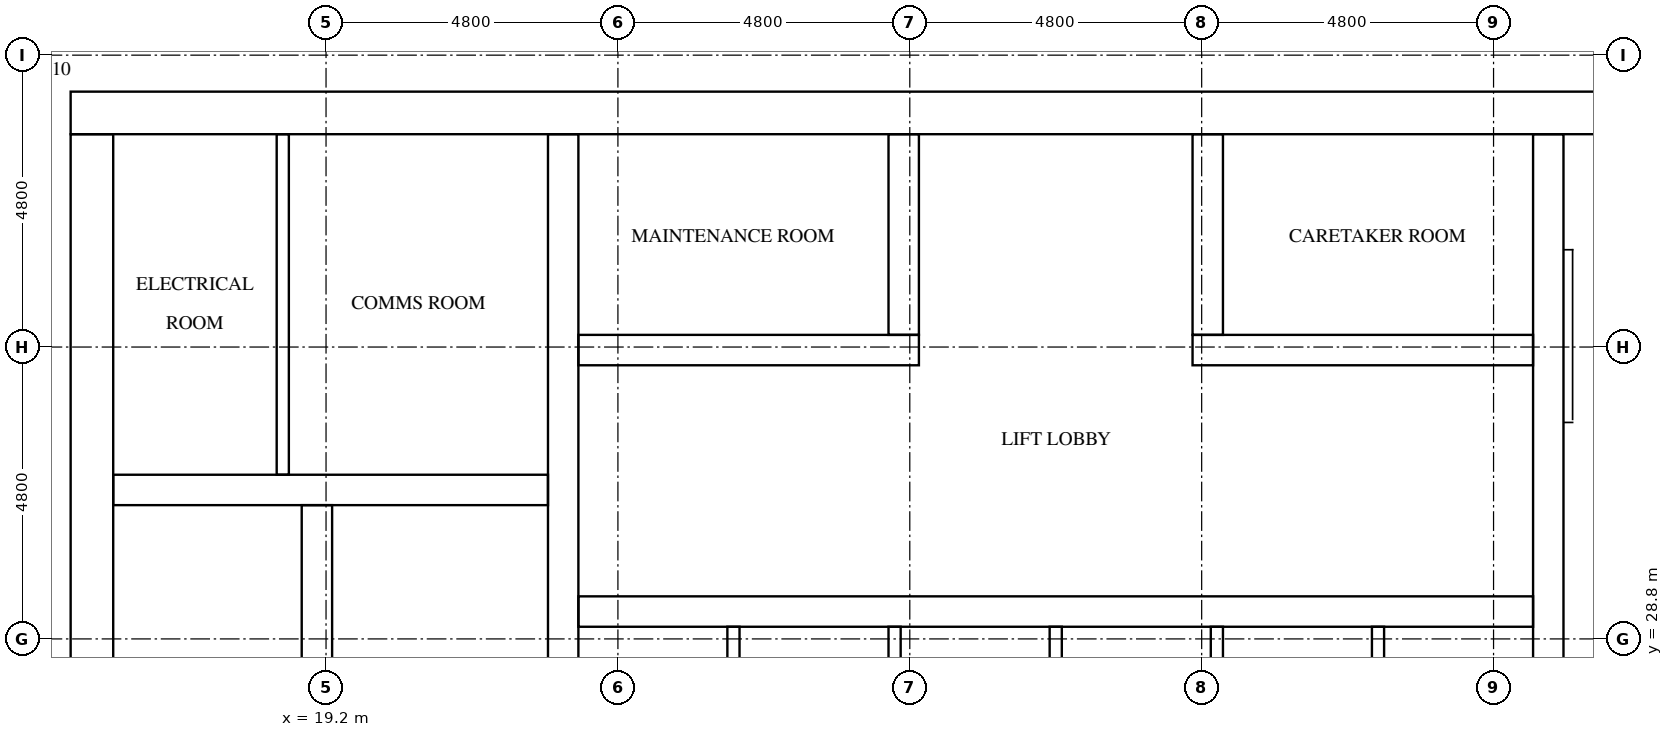
"""IFC4 building model, lengths in metres.
Left out: names, types, materials, properties, quantities, classifications, styles, units other than length and angle.
Written with IfcOpenShell. Run it as: python <this file> out.ifc"""

import sys

from ifc_helpers import new_model, si_unit, direction, frame, frame_2d, origin, place, context, subcontext, project, spatial, rectangle, extrude, element, fill, save


model = new_model("IFC4")
c1 = context("Model", 3, precision=1e-05, world=origin(), true_north=direction((0.0, 1.0)))
c2 = subcontext(c1, "Body", "Model", "MODEL_VIEW")
j1 = project(units=[si_unit("LENGTHUNIT", "METRE"), si_unit("PLANEANGLEUNIT", "RADIAN")], contexts=[c1])
p1 = place(None, origin())
s1 = spatial("IfcSite", under=j1, at=p1, CompositionType="ELEMENT")
p2 = place(p1, origin())
s2 = spatial("IfcBuilding", under=s1, at=p2, CompositionType="ELEMENT")
p3 = place(p2, frame((0.0, 0.0, 229.8)))
s3 = spatial("IfcBuildingStorey", under=s2, at=p3, CompositionType="ELEMENT", Elevation=229.8)
p4 = place(p3, frame((15.0, 37.45, 0.0), z_axis=(0.0, 0.0, 1.0), x_axis=(1.0, 0.0, 0.0)))
e1 = element("IfcWall", 1, at=p4, inside=s3, PredefinedType="SHEAR", context=c2, shape_type="SweptSolid", body=[
    extrude(rectangle(XDim=32.4, YDim=0.7, at=frame_2d((16.2, 0.0))), origin(), (0.0, 0.0, 1.0), 3.1),
])
p5 = place(p4, frame((15.3, 0.0, 0.0)))
e2 = element("IfcOpeningElement", 2, at=p5, cuts=e1, PredefinedType="OPENING", context=c2, shape_type="SweptSolid", body=[
    extrude(rectangle(XDim=1.8, YDim=2.1, at=frame_2d((0.9, 1.05))), frame((0.0, 0.36, 0.0), z_axis=(0.0, -1.0, 0.0), x_axis=(1.0, 0.0, 0.0)), (0.0, 0.0, 1.0), 0.72),
])
p6 = place(p4, frame((1.544, 0.0, 0.0)))
e3 = element("IfcOpeningElement", 3, at=p6, cuts=e1, PredefinedType="OPENING", context=c2, shape_type="SweptSolid", body=[
    extrude(rectangle(XDim=1.0, YDim=2.1, at=frame_2d((0.5, 1.05))), frame((0.0, 0.36, 0.0), z_axis=(0.0, -1.0, 0.0), x_axis=(1.0, 0.0, 0.0)), (0.0, 0.0, 1.0), 0.72),
])
p7 = place(p4, frame((5.219, 0.0, 0.0)))
e4 = element("IfcOpeningElement", 4, at=p7, cuts=e1, PredefinedType="OPENING", context=c2, shape_type="SweptSolid", body=[
    extrude(rectangle(XDim=1.0, YDim=2.1, at=frame_2d((0.5, 1.05))), frame((0.0, 0.36, 0.0), z_axis=(0.0, -1.0, 0.0), x_axis=(1.0, 0.0, 0.0)), (0.0, 0.0, 1.0), 0.72),
])
p8 = place(p3, frame((15.35, 15.7, 0.0), z_axis=(0.0, 0.0, 1.0), x_axis=(0.0, 1.0, 0.0)))
e5 = element("IfcWall", 5, at=p8, inside=s3, PredefinedType="SHEAR", context=c2, shape_type="SweptSolid", body=[
    extrude(rectangle(XDim=21.4, YDim=0.7, at=frame_2d((10.7, 0.0))), origin(), (0.0, 0.0, 1.0), 3.1),
])
p9 = place(p8, frame((5.06, 0.0, 0.0)))
e6 = element("IfcOpeningElement", 6, at=p9, cuts=e5, PredefinedType="OPENING", context=c2, shape_type="SweptSolid", body=[
    extrude(rectangle(XDim=1.2, YDim=2.1, at=frame_2d((0.6, 1.05))), frame((0.0, 0.36, 0.0), z_axis=(0.0, -1.0, 0.0), x_axis=(1.0, 0.0, 0.0)), (0.0, 0.0, 1.0), 0.72),
])
p10 = place(p3, frame((19.05, 15.7, 0.0), z_axis=(0.0, 0.0, 1.0), x_axis=(0.0, 1.0, 0.0)))
e7 = element("IfcWall", 7, at=p10, inside=s3, PredefinedType="SHEAR", context=c2, shape_type="SweptSolid", body=[
    extrude(rectangle(XDim=15.3, YDim=0.5, at=frame_2d((7.65, 0.0))), origin(), (0.0, 0.0, 1.0), 3.1),
])
p11 = place(p10, frame((9.75, 0.0, 0.0)))
e8 = element("IfcOpeningElement", 8, at=p11, cuts=e7, PredefinedType="OPENING", context=c2, shape_type="SweptSolid", body=[
    extrude(rectangle(XDim=1.1, YDim=2.1, at=frame_2d((0.55, 1.05))), frame((0.0, 0.26, 0.0), z_axis=(0.0, -1.0, 0.0), x_axis=(1.0, 0.0, 0.0)), (0.0, 0.0, 1.0), 0.52),
])
p12 = place(p10, frame((13.25, 0.0, 0.0)))
e9 = element("IfcOpeningElement", 9, at=p12, cuts=e7, PredefinedType="OPENING", context=c2, shape_type="SweptSolid", body=[
    extrude(rectangle(XDim=1.1, YDim=2.1, at=frame_2d((0.55, 1.05))), frame((0.0, 0.26, 0.0), z_axis=(0.0, -1.0, 0.0), x_axis=(1.0, 0.0, 0.0)), (0.0, 0.0, 1.0), 0.52),
])
p13 = place(p10, frame((0.5, 0.0, 0.0)))
e10 = element("IfcOpeningElement", 10, at=p13, cuts=e7, PredefinedType="OPENING", context=c2, shape_type="SweptSolid", body=[
    extrude(rectangle(XDim=1.2, YDim=2.1, at=frame_2d((0.6, 1.05))), frame((0.0, 0.26, 0.0), z_axis=(0.0, -1.0, 0.0), x_axis=(1.0, 0.0, 0.0)), (0.0, 0.0, 1.0), 0.52),
])
p14 = place(p3, frame((23.1, 15.7, 0.0), z_axis=(0.0, 0.0, 1.0), x_axis=(0.0, 1.0, 0.0)))
e11 = element("IfcWall", 11, at=p14, inside=s3, PredefinedType="SHEAR", context=c2, shape_type="SweptSolid", body=[
    extrude(rectangle(XDim=21.4, YDim=0.5, at=frame_2d((10.7, 0.0))), origin(), (0.0, 0.0, 1.0), 3.1),
])
p15 = place(p3, frame((39.3, 27.75, 0.0), z_axis=(0.0, 0.0, 1.0), x_axis=(0.0, 1.0, 0.0)))
e12 = element("IfcWall", 12, at=p15, inside=s3, PredefinedType="SHEAR", context=c2, shape_type="SweptSolid", body=[
    extrude(rectangle(XDim=9.35, YDim=0.5, at=frame_2d((4.675, 0.0))), origin(), (0.0, 0.0, 1.0), 3.1),
])
p16 = place(p3, frame((15.7, 31.25, 0.0), z_axis=(0.0, 0.0, 1.0), x_axis=(1.0, 0.0, 0.0)))
e13 = element("IfcWall", 13, at=p16, inside=s3, PredefinedType="SHEAR", context=c2, shape_type="SweptSolid", body=[
    extrude(rectangle(XDim=7.15, YDim=0.5, at=frame_2d((3.575, 0.0))), origin(), (0.0, 0.0, 1.0), 3.1),
])
p17 = place(p3, frame((23.35, 29.25, 0.0), z_axis=(0.0, 0.0, 1.0), x_axis=(1.0, 0.0, 0.0)))
e14 = element("IfcWall", 14, at=p17, inside=s3, PredefinedType="SHEAR", context=c2, shape_type="SweptSolid", body=[
    extrude(rectangle(XDim=15.7, YDim=0.5, at=frame_2d((7.85, 0.0))), origin(), (0.0, 0.0, 1.0), 3.1),
])
p18 = place(p17, frame((0.675, 0.0, 0.0)))
e15 = element("IfcOpeningElement", 15, at=p18, cuts=e14, PredefinedType="OPENING", context=c2, shape_type="SweptSolid", body=[
    extrude(rectangle(XDim=1.1, YDim=2.1, at=frame_2d((0.55, 1.05))), frame((0.0, 0.26, 0.0), z_axis=(0.0, -1.0, 0.0), x_axis=(1.0, 0.0, 0.0)), (0.0, 0.0, 1.0), 0.52),
])
p19 = place(p17, frame((3.325, 0.0, 0.0)))
e16 = element("IfcOpeningElement", 16, at=p19, cuts=e14, PredefinedType="OPENING", context=c2, shape_type="SweptSolid", body=[
    extrude(rectangle(XDim=1.1, YDim=2.1, at=frame_2d((0.55, 1.05))), frame((0.0, 0.26, 0.0), z_axis=(0.0, -1.0, 0.0), x_axis=(1.0, 0.0, 0.0)), (0.0, 0.0, 1.0), 0.52),
])
p20 = place(p17, frame((5.975, 0.0, 0.0)))
e17 = element("IfcOpeningElement", 17, at=p20, cuts=e14, PredefinedType="OPENING", context=c2, shape_type="SweptSolid", body=[
    extrude(rectangle(XDim=1.1, YDim=2.1, at=frame_2d((0.55, 1.05))), frame((0.0, 0.26, 0.0), z_axis=(0.0, -1.0, 0.0), x_axis=(1.0, 0.0, 0.0)), (0.0, 0.0, 1.0), 0.52),
])
p21 = place(p17, frame((8.625, 0.0, 0.0)))
e18 = element("IfcOpeningElement", 18, at=p21, cuts=e14, PredefinedType="OPENING", context=c2, shape_type="SweptSolid", body=[
    extrude(rectangle(XDim=1.1, YDim=2.1, at=frame_2d((0.55, 1.05))), frame((0.0, 0.26, 0.0), z_axis=(0.0, -1.0, 0.0), x_axis=(1.0, 0.0, 0.0)), (0.0, 0.0, 1.0), 0.52),
])
p22 = place(p17, frame((11.275, 0.0, 0.0)))
e19 = element("IfcOpeningElement", 19, at=p22, cuts=e14, PredefinedType="OPENING", context=c2, shape_type="SweptSolid", body=[
    extrude(rectangle(XDim=1.1, YDim=2.1, at=frame_2d((0.55, 1.05))), frame((0.0, 0.26, 0.0), z_axis=(0.0, -1.0, 0.0), x_axis=(1.0, 0.0, 0.0)), (0.0, 0.0, 1.0), 0.52),
])
p23 = place(p17, frame((13.925, 0.0, 0.0)))
e20 = element("IfcOpeningElement", 20, at=p23, cuts=e14, PredefinedType="OPENING", context=c2, shape_type="SweptSolid", body=[
    extrude(rectangle(XDim=1.1, YDim=2.1, at=frame_2d((0.55, 1.05))), frame((0.0, 0.26, 0.0), z_axis=(0.0, -1.0, 0.0), x_axis=(1.0, 0.0, 0.0)), (0.0, 0.0, 1.0), 0.52),
])
p24 = place(p3, frame((23.35, 33.55, 0.0), z_axis=(0.0, 0.0, 1.0), x_axis=(1.0, 0.0, 0.0)))
e21 = element("IfcWall", 21, at=p24, inside=s3, PredefinedType="SHEAR", context=c2, shape_type="SweptSolid", body=[
    extrude(rectangle(XDim=5.6, YDim=0.5, at=frame_2d((2.8, 0.0))), origin(), (0.0, 0.0, 1.0), 3.1),
])
p25 = place(p24, frame((2.05, 0.0, 0.0)))
e22 = element("IfcOpeningElement", 22, at=p25, cuts=e21, PredefinedType="OPENING", context=c2, shape_type="SweptSolid", body=[
    extrude(rectangle(XDim=1.0, YDim=2.1, at=frame_2d((0.5, 1.05))), frame((0.0, 0.26, 0.0), z_axis=(0.0, -1.0, 0.0), x_axis=(1.0, 0.0, 0.0)), (0.0, 0.0, 1.0), 0.52),
])
p26 = place(p3, frame((33.45, 33.55, 0.0), z_axis=(0.0, 0.0, 1.0), x_axis=(1.0, 0.0, 0.0)))
e23 = element("IfcWall", 23, at=p26, inside=s3, PredefinedType="SHEAR", context=c2, shape_type="SweptSolid", body=[
    extrude(rectangle(XDim=5.6, YDim=0.5, at=frame_2d((2.8, 0.0))), origin(), (0.0, 0.0, 1.0), 3.1),
])
p27 = place(p26, frame((2.55, 0.0, 0.0)))
e24 = element("IfcOpeningElement", 24, at=p27, cuts=e23, PredefinedType="OPENING", context=c2, shape_type="SweptSolid", body=[
    extrude(rectangle(XDim=1.0, YDim=2.1, at=frame_2d((0.5, 1.05))), frame((0.0, 0.26, 0.0), z_axis=(0.0, -1.0, 0.0), x_axis=(1.0, 0.0, 0.0)), (0.0, 0.0, 1.0), 0.52),
])
for number, where, z_axis, x_axis in (
    (25, (28.7, 33.8, 0.0), (0.0, 0.0, 1.0), (0.0, 1.0, 0.0)),
    (26, (33.7, 33.8, 0.0), (0.0, 0.0, 1.0), (0.0, 1.0, 0.0)),
):
    element("IfcWall", number, at=place(p3, frame(where, z_axis=z_axis, x_axis=x_axis)), inside=s3, PredefinedType="SHEAR", context=c2, shape_type="SweptSolid", body=[
        extrude(rectangle(XDim=3.3, YDim=0.5, at=frame_2d((1.65, 0.0))), origin(), (0.0, 0.0, 1.0), 3.1),
    ])
for number, where, z_axis, x_axis in (
    (27, (25.9, 26.4, 0.0), (0.0, 0.0, 1.0), (0.0, 1.0, 0.0)),
    (28, (28.55, 26.4, 0.0), (0.0, 0.0, 1.0), (0.0, 1.0, 0.0)),
    (29, (31.2, 26.4, 0.0), (0.0, 0.0, 1.0), (0.0, 1.0, 0.0)),
    (30, (33.85, 26.4, 0.0), (0.0, 0.0, 1.0), (0.0, 1.0, 0.0)),
    (31, (36.5, 26.4, 0.0), (0.0, 0.0, 1.0), (0.0, 1.0, 0.0)),
):
    element("IfcWall", number, at=place(p3, frame(where, z_axis=z_axis, x_axis=x_axis)), inside=s3, PredefinedType="SOLIDWALL", context=c2, shape_type="SweptSolid", body=[
        extrude(rectangle(XDim=2.6, YDim=0.2, at=frame_2d((1.3, 0.0))), origin(), (0.0, 0.0, 1.0), 3.1),
    ])
p28 = place(p3, frame((18.489, 31.5, 0.0), z_axis=(0.0, 0.0, 1.0), x_axis=(0.0, 1.0, 0.0)))
e32 = element("IfcWall", 32, at=p28, inside=s3, PredefinedType="PARTITIONING", context=c2, shape_type="SweptSolid", body=[
    extrude(rectangle(XDim=5.6, YDim=0.2, at=frame_2d((2.8, 0.0))), origin(), (0.0, 0.0, 1.0), 3.1),
])
p29 = place(p18, origin())
e33 = element("IfcDoor", 33, at=p29, inside=s3, OperationType="DOUBLE_DOOR_SLIDING", PredefinedType="DOOR", context=c2, shape_type="SweptSolid", body=[
    extrude(rectangle(XDim=1.1, YDim=2.1, at=frame_2d((0.55, 1.05))), frame((0.0, 0.025, 0.0), z_axis=(0.0, -1.0, 0.0), x_axis=(1.0, 0.0, 0.0)), (0.0, 0.0, 1.0), 0.05),
])
fill(e15, e33)
p30 = place(p19, origin())
e34 = element("IfcDoor", 34, at=p30, inside=s3, OperationType="DOUBLE_DOOR_SLIDING", PredefinedType="DOOR", context=c2, shape_type="SweptSolid", body=[
    extrude(rectangle(XDim=1.1, YDim=2.1, at=frame_2d((0.55, 1.05))), frame((0.0, 0.025, 0.0), z_axis=(0.0, -1.0, 0.0), x_axis=(1.0, 0.0, 0.0)), (0.0, 0.0, 1.0), 0.05),
])
fill(e16, e34)
p31 = place(p20, origin())
e35 = element("IfcDoor", 35, at=p31, inside=s3, OperationType="DOUBLE_DOOR_SLIDING", PredefinedType="DOOR", context=c2, shape_type="SweptSolid", body=[
    extrude(rectangle(XDim=1.1, YDim=2.1, at=frame_2d((0.55, 1.05))), frame((0.0, 0.025, 0.0), z_axis=(0.0, -1.0, 0.0), x_axis=(1.0, 0.0, 0.0)), (0.0, 0.0, 1.0), 0.05),
])
fill(e17, e35)
p32 = place(p21, origin())
e36 = element("IfcDoor", 36, at=p32, inside=s3, OperationType="DOUBLE_DOOR_SLIDING", PredefinedType="DOOR", context=c2, shape_type="SweptSolid", body=[
    extrude(rectangle(XDim=1.1, YDim=2.1, at=frame_2d((0.55, 1.05))), frame((0.0, 0.025, 0.0), z_axis=(0.0, -1.0, 0.0), x_axis=(1.0, 0.0, 0.0)), (0.0, 0.0, 1.0), 0.05),
])
fill(e18, e36)
p33 = place(p22, origin())
e37 = element("IfcDoor", 37, at=p33, inside=s3, OperationType="DOUBLE_DOOR_SLIDING", PredefinedType="DOOR", context=c2, shape_type="SweptSolid", body=[
    extrude(rectangle(XDim=1.1, YDim=2.1, at=frame_2d((0.55, 1.05))), frame((0.0, 0.025, 0.0), z_axis=(0.0, -1.0, 0.0), x_axis=(1.0, 0.0, 0.0)), (0.0, 0.0, 1.0), 0.05),
])
fill(e19, e37)
p34 = place(p23, origin())
e38 = element("IfcDoor", 38, at=p34, inside=s3, OperationType="DOUBLE_DOOR_SLIDING", PredefinedType="DOOR", context=c2, shape_type="SweptSolid", body=[
    extrude(rectangle(XDim=1.1, YDim=2.1, at=frame_2d((0.55, 1.05))), frame((0.0, 0.025, 0.0), z_axis=(0.0, -1.0, 0.0), x_axis=(1.0, 0.0, 0.0)), (0.0, 0.0, 1.0), 0.05),
])
fill(e20, e38)
p35 = place(p12, origin())
e39 = element("IfcDoor", 39, at=p35, inside=s3, OperationType="DOUBLE_DOOR_SLIDING", PredefinedType="DOOR", context=c2, shape_type="SweptSolid", body=[
    extrude(rectangle(XDim=1.1, YDim=2.1, at=frame_2d((0.55, 1.05))), frame((0.0, 0.025, 0.0), z_axis=(0.0, -1.0, 0.0), x_axis=(1.0, 0.0, 0.0)), (0.0, 0.0, 1.0), 0.05),
])
fill(e9, e39)
p36 = place(p5, origin())
e40 = element("IfcDoor", 40, at=p36, inside=s3, OperationType="DOUBLE_DOOR_SINGLE_SWING", PredefinedType="DOOR", context=c2, shape_type="SweptSolid", body=[
    extrude(rectangle(XDim=1.8, YDim=2.1, at=frame_2d((0.9, 1.05))), frame((0.0, 0.025, 0.0), z_axis=(0.0, -1.0, 0.0), x_axis=(1.0, 0.0, 0.0)), (0.0, 0.0, 1.0), 0.05),
])
fill(e2, e40)
p37 = place(p6, origin())
e41 = element("IfcDoor", 41, at=p37, inside=s3, OperationType="SINGLE_SWING_LEFT", PredefinedType="DOOR", context=c2, shape_type="SweptSolid", body=[
    extrude(rectangle(XDim=1.0, YDim=2.1, at=frame_2d((0.5, 1.05))), frame((0.0, 0.025, 0.0), z_axis=(0.0, -1.0, 0.0), x_axis=(1.0, 0.0, 0.0)), (0.0, 0.0, 1.0), 0.05),
])
fill(e3, e41)
p38 = place(p7, origin())
e42 = element("IfcDoor", 42, at=p38, inside=s3, OperationType="SINGLE_SWING_RIGHT", PredefinedType="DOOR", context=c2, shape_type="SweptSolid", body=[
    extrude(rectangle(XDim=1.0, YDim=2.1, at=frame_2d((0.5, 1.05))), frame((0.0, 0.025, 0.0), z_axis=(0.0, -1.0, 0.0), x_axis=(1.0, 0.0, 0.0)), (0.0, 0.0, 1.0), 0.05),
])
fill(e4, e42)
p39 = place(p25, frame((1.0, 0.0, 0.0), z_axis=(0.0, 0.0, 1.0), x_axis=(-1.0, 0.0, 0.0)))
e43 = element("IfcDoor", 43, at=p39, inside=s3, OperationType="SINGLE_SWING_LEFT", PredefinedType="DOOR", context=c2, shape_type="SweptSolid", body=[
    extrude(rectangle(XDim=1.0, YDim=2.1, at=frame_2d((0.5, 1.05))), frame((0.0, 0.025, 0.0), z_axis=(0.0, -1.0, 0.0), x_axis=(1.0, 0.0, 0.0)), (0.0, 0.0, 1.0), 0.05),
])
fill(e22, e43)
p40 = place(p27, frame((1.0, 0.0, 0.0), z_axis=(0.0, 0.0, 1.0), x_axis=(-1.0, 0.0, 0.0)))
e44 = element("IfcDoor", 44, at=p40, inside=s3, OperationType="SINGLE_SWING_RIGHT", PredefinedType="DOOR", context=c2, shape_type="SweptSolid", body=[
    extrude(rectangle(XDim=1.0, YDim=2.1, at=frame_2d((0.5, 1.05))), frame((0.0, 0.025, 0.0), z_axis=(0.0, -1.0, 0.0), x_axis=(1.0, 0.0, 0.0)), (0.0, 0.0, 1.0), 0.05),
])
fill(e24, e44)
save(model, sys.argv[1])
